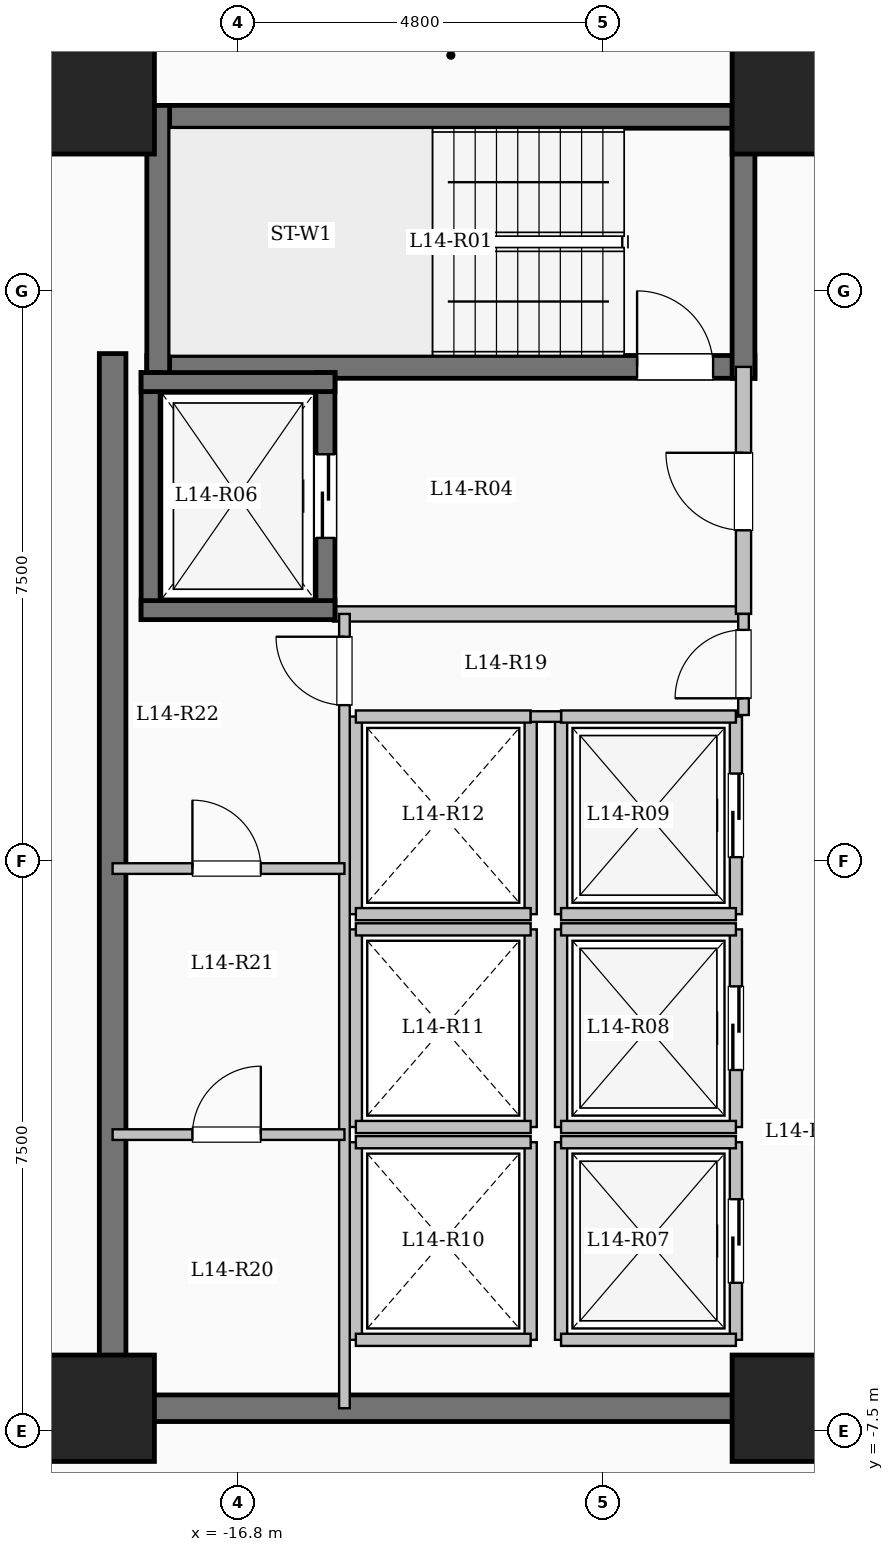
"""IFC4 building model, lengths in metres.
Left out: names, types, materials, properties, quantities, classifications, styles, units other than length and angle.
Written with IfcOpenShell. Run it as: python <this file> out.ifc"""

import sys

from ifc_helpers import new_model, si_unit, direction, frame, frame_2d, origin, origin_2d, place, context, subcontext, project, spatial, rectangle, extrude, element, fill, save


model = new_model("IFC4")
c1 = context("Model", 3, precision=1e-05, world=origin(), true_north=direction((0.0, 1.0)))
c2 = subcontext(c1, "Body", "Model", "MODEL_VIEW")
j1 = project(units=[si_unit("LENGTHUNIT", "METRE"), si_unit("PLANEANGLEUNIT", "RADIAN")], contexts=[c1])
p1 = place(None, origin())
s1 = spatial("IfcSite", under=j1, at=p1, CompositionType="ELEMENT")
p2 = place(p1, origin())
s2 = spatial("IfcBuilding", under=s1, at=p2, CompositionType="ELEMENT")
p3 = place(p2, frame((0.0, 0.0, 54.15)))
s3 = spatial("IfcBuildingStorey", under=s2, at=p3, CompositionType="ELEMENT", Elevation=54.15)
for number, where, z_axis, x_axis in (
    (1, (-9.6, -7.2, 0.0), (0.0, 0.0, 1.0), (1.0, 0.0, 0.0)),
    (2, (-9.6, 10.0, 0.0), (0.0, 0.0, 1.0), (1.0, 0.0, 0.0)),
    (3, (-18.6, -7.2, 0.0), (0.0, 0.0, 1.0), (1.0, 0.0, 0.0)),
    (4, (-18.6, 10.0, 0.0), (0.0, 0.0, 1.0), (1.0, 0.0, 0.0)),
):
    element("IfcColumn", number, at=place(p3, frame(where, z_axis=z_axis, x_axis=x_axis)), inside=s3, PredefinedType="COLUMN", context=c2, shape_type="SweptSolid", body=[
        extrude(rectangle(XDim=1.4, YDim=1.4, at=origin_2d()), origin(), (0.0, 0.0, 1.0), 3.35),
    ])
p4 = place(p3, frame((-18.0, 9.79, 0.0), z_axis=(0.0, 0.0, 1.0), x_axis=(1.0, 0.0, 0.0)))
e5 = element("IfcWall", 5, at=p4, inside=s3, PredefinedType="SHEAR", context=c2, shape_type="SweptSolid", body=[
    extrude(rectangle(XDim=8.0, YDim=0.3, at=frame_2d((4.0, 0.0))), origin(), (0.0, 0.0, 1.0), 3.35),
])
p5 = place(p3, frame((-18.0, 6.5, 0.0), z_axis=(0.0, 0.0, 1.0), x_axis=(1.0, 0.0, 0.0)))
e6 = element("IfcWall", 6, at=p5, inside=s3, PredefinedType="SHEAR", context=c2, shape_type="SweptSolid", body=[
    extrude(rectangle(XDim=8.0, YDim=0.3, at=frame_2d((4.0, 0.0))), origin(), (0.0, 0.0, 1.0), 3.35),
])
p6 = place(p5, frame((6.45, 0.0, 0.0)))
e7 = element("IfcOpeningElement", 7, at=p6, cuts=e6, PredefinedType="OPENING", context=c2, shape_type="SweptSolid", body=[
    extrude(rectangle(XDim=1.0, YDim=2.15, at=frame_2d((0.5, 1.075))), frame((0.0, 0.16, 0.0), z_axis=(0.0, -1.0, 0.0), x_axis=(1.0, 0.0, 0.0)), (0.0, 0.0, 1.0), 0.32),
])
for number, where, z_axis, x_axis in (
    (8, (-17.85, 6.35, 0.0), (0.0, 0.0, 1.0), (0.0, 1.0, 0.0)),
    (9, (-10.15, 6.35, 0.0), (0.0, 0.0, 1.0), (0.0, 1.0, 0.0)),
):
    element("IfcWall", number, at=place(p3, frame(where, z_axis=z_axis, x_axis=x_axis)), inside=s3, PredefinedType="SHEAR", context=c2, shape_type="SweptSolid", body=[
        extrude(rectangle(XDim=3.59, YDim=0.3, at=frame_2d((1.795, 0.0))), origin(), (0.0, 0.0, 1.0), 3.35),
    ])
p7 = place(p3, frame((-15.55, 3.25, 0.0), z_axis=(0.0, 0.0, 1.0), x_axis=(1.0, 0.0, 0.0)))
e10 = element("IfcWall", 10, at=p7, inside=s3, PredefinedType="SOLIDWALL", context=c2, shape_type="SweptSolid", body=[
    extrude(rectangle(XDim=5.4, YDim=0.2, at=frame_2d((2.7, 0.0))), origin(), (0.0, 0.0, 1.0), 3.1),
])
p8 = place(p3, frame((-10.15, 3.25, 0.0), z_axis=(0.0, 0.0, 1.0), x_axis=(0.0, 1.0, 0.0)))
e11 = element("IfcWall", 11, at=p8, inside=s3, PredefinedType="SOLIDWALL", context=c2, shape_type="SweptSolid", body=[
    extrude(rectangle(XDim=3.25, YDim=0.2, at=frame_2d((1.625, 0.0))), origin(), (0.0, 0.0, 1.0), 3.1),
])
p9 = place(p8, frame((1.1, 0.0, 0.0)))
e12 = element("IfcOpeningElement", 12, at=p9, cuts=e11, PredefinedType="OPENING", context=c2, shape_type="SweptSolid", body=[
    extrude(rectangle(XDim=1.02, YDim=2.15, at=frame_2d((0.51, 1.075))), frame((0.0, 0.11, 0.0), z_axis=(0.0, -1.0, 0.0), x_axis=(1.0, 0.0, 0.0)), (0.0, 0.0, 1.0), 0.22),
])
p10 = place(p3, frame((-17.95, 3.175, 0.0), z_axis=(0.0, 0.0, 1.0), x_axis=(0.0, 1.0, 0.0)))
e13 = element("IfcWall", 13, at=p10, inside=s3, PredefinedType="SHEAR", context=c2, shape_type="SweptSolid", body=[
    extrude(rectangle(XDim=3.25, YDim=0.25, at=frame_2d((1.625, 0.0))), origin(), (0.0, 0.0, 1.0), 3.35),
])
p11 = place(p3, frame((-15.65, 3.175, 0.0), z_axis=(0.0, 0.0, 1.0), x_axis=(0.0, 1.0, 0.0)))
e14 = element("IfcWall", 14, at=p11, inside=s3, PredefinedType="SHEAR", context=c2, shape_type="SweptSolid", body=[
    extrude(rectangle(XDim=3.25, YDim=0.25, at=frame_2d((1.625, 0.0))), origin(), (0.0, 0.0, 1.0), 3.35),
])
p12 = place(p11, frame((1.075, 0.0, 0.0)))
e15 = element("IfcOpeningElement", 15, at=p12, cuts=e14, PredefinedType="OPENING", context=c2, shape_type="SweptSolid", body=[
    extrude(rectangle(XDim=1.1, YDim=2.15, at=frame_2d((0.55, 1.075))), frame((0.0, 0.135, 0.0), z_axis=(0.0, -1.0, 0.0), x_axis=(1.0, 0.0, 0.0)), (0.0, 0.0, 1.0), 0.27),
])
for number, where, z_axis, x_axis in (
    (16, (-18.075, 3.3, 0.0), (0.0, 0.0, 1.0), (1.0, 0.0, 0.0)),
    (17, (-18.075, 6.3, 0.0), (0.0, 0.0, 1.0), (1.0, 0.0, 0.0)),
):
    element("IfcWall", number, at=place(p3, frame(where, z_axis=z_axis, x_axis=x_axis)), inside=s3, PredefinedType="SHEAR", context=c2, shape_type="SweptSolid", body=[
        extrude(rectangle(XDim=2.55, YDim=0.25, at=frame_2d((1.275, 0.0))), origin(), (0.0, 0.0, 1.0), 3.35),
    ])
p13 = place(p3, frame((-12.55, -6.3, 0.0), z_axis=(0.0, 0.0, 1.0), x_axis=(0.0, 1.0, 0.0)))
e18 = element("IfcWall", 18, at=p13, inside=s3, PredefinedType="SOLIDWALL", context=c2, shape_type="SweptSolid", body=[
    extrude(rectangle(XDim=2.6, YDim=0.16, at=frame_2d((1.3, 0.0))), origin(), (0.0, 0.0, 1.0), 3.1),
])
p14 = place(p3, frame((-10.25, -6.3, 0.0), z_axis=(0.0, 0.0, 1.0), x_axis=(0.0, 1.0, 0.0)))
e19 = element("IfcWall", 19, at=p14, inside=s3, PredefinedType="SOLIDWALL", context=c2, shape_type="SweptSolid", body=[
    extrude(rectangle(XDim=2.6, YDim=0.16, at=frame_2d((1.3, 0.0))), origin(), (0.0, 0.0, 1.0), 3.1),
])
p15 = place(p14, frame((0.75, 0.0, 0.0)))
e20 = element("IfcOpeningElement", 20, at=p15, cuts=e19, PredefinedType="OPENING", context=c2, shape_type="SweptSolid", body=[
    extrude(rectangle(XDim=1.1, YDim=2.15, at=frame_2d((0.55, 1.075))), frame((0.0, 0.09, 0.0), z_axis=(0.0, -1.0, 0.0), x_axis=(1.0, 0.0, 0.0)), (0.0, 0.0, 1.0), 0.18),
])
for number, where, z_axis, x_axis in (
    (21, (-12.55, -6.3, 0.0), (0.0, 0.0, 1.0), (1.0, 0.0, 0.0)),
    (22, (-12.55, -3.7, 0.0), (0.0, 0.0, 1.0), (1.0, 0.0, 0.0)),
):
    element("IfcWall", number, at=place(p3, frame(where, z_axis=z_axis, x_axis=x_axis)), inside=s3, PredefinedType="SOLIDWALL", context=c2, shape_type="SweptSolid", body=[
        extrude(rectangle(XDim=2.3, YDim=0.16, at=frame_2d((1.15, 0.0))), origin(), (0.0, 0.0, 1.0), 3.1),
    ])
p16 = place(p3, frame((-12.55, -3.5, 0.0), z_axis=(0.0, 0.0, 1.0), x_axis=(0.0, 1.0, 0.0)))
e23 = element("IfcWall", 23, at=p16, inside=s3, PredefinedType="SOLIDWALL", context=c2, shape_type="SweptSolid", body=[
    extrude(rectangle(XDim=2.6, YDim=0.16, at=frame_2d((1.3, 0.0))), origin(), (0.0, 0.0, 1.0), 3.1),
])
p17 = place(p3, frame((-10.25, -3.5, 0.0), z_axis=(0.0, 0.0, 1.0), x_axis=(0.0, 1.0, 0.0)))
e24 = element("IfcWall", 24, at=p17, inside=s3, PredefinedType="SOLIDWALL", context=c2, shape_type="SweptSolid", body=[
    extrude(rectangle(XDim=2.6, YDim=0.16, at=frame_2d((1.3, 0.0))), origin(), (0.0, 0.0, 1.0), 3.1),
])
p18 = place(p17, frame((0.75, 0.0, 0.0)))
e25 = element("IfcOpeningElement", 25, at=p18, cuts=e24, PredefinedType="OPENING", context=c2, shape_type="SweptSolid", body=[
    extrude(rectangle(XDim=1.1, YDim=2.15, at=frame_2d((0.55, 1.075))), frame((0.0, 0.09, 0.0), z_axis=(0.0, -1.0, 0.0), x_axis=(1.0, 0.0, 0.0)), (0.0, 0.0, 1.0), 0.18),
])
for number, where, z_axis, x_axis in (
    (26, (-12.55, -3.5, 0.0), (0.0, 0.0, 1.0), (1.0, 0.0, 0.0)),
    (27, (-12.55, -0.9, 0.0), (0.0, 0.0, 1.0), (1.0, 0.0, 0.0)),
):
    element("IfcWall", number, at=place(p3, frame(where, z_axis=z_axis, x_axis=x_axis)), inside=s3, PredefinedType="SOLIDWALL", context=c2, shape_type="SweptSolid", body=[
        extrude(rectangle(XDim=2.3, YDim=0.16, at=frame_2d((1.15, 0.0))), origin(), (0.0, 0.0, 1.0), 3.1),
    ])
p19 = place(p3, frame((-12.55, -0.7, 0.0), z_axis=(0.0, 0.0, 1.0), x_axis=(0.0, 1.0, 0.0)))
e28 = element("IfcWall", 28, at=p19, inside=s3, PredefinedType="SOLIDWALL", context=c2, shape_type="SweptSolid", body=[
    extrude(rectangle(XDim=2.6, YDim=0.16, at=frame_2d((1.3, 0.0))), origin(), (0.0, 0.0, 1.0), 3.1),
])
p20 = place(p3, frame((-10.25, -0.7, 0.0), z_axis=(0.0, 0.0, 1.0), x_axis=(0.0, 1.0, 0.0)))
e29 = element("IfcWall", 29, at=p20, inside=s3, PredefinedType="SOLIDWALL", context=c2, shape_type="SweptSolid", body=[
    extrude(rectangle(XDim=2.6, YDim=0.16, at=frame_2d((1.3, 0.0))), origin(), (0.0, 0.0, 1.0), 3.1),
])
p21 = place(p20, frame((0.75, 0.0, 0.0)))
e30 = element("IfcOpeningElement", 30, at=p21, cuts=e29, PredefinedType="OPENING", context=c2, shape_type="SweptSolid", body=[
    extrude(rectangle(XDim=1.1, YDim=2.15, at=frame_2d((0.55, 1.075))), frame((0.0, 0.09, 0.0), z_axis=(0.0, -1.0, 0.0), x_axis=(1.0, 0.0, 0.0)), (0.0, 0.0, 1.0), 0.18),
])
for number, where, z_axis, x_axis in (
    (31, (-12.55, -0.7, 0.0), (0.0, 0.0, 1.0), (1.0, 0.0, 0.0)),
    (32, (-12.55, 1.9, 0.0), (0.0, 0.0, 1.0), (1.0, 0.0, 0.0)),
):
    element("IfcWall", number, at=place(p3, frame(where, z_axis=z_axis, x_axis=x_axis)), inside=s3, PredefinedType="SOLIDWALL", context=c2, shape_type="SweptSolid", body=[
        extrude(rectangle(XDim=2.3, YDim=0.16, at=frame_2d((1.15, 0.0))), origin(), (0.0, 0.0, 1.0), 3.1),
    ])
for number, where, z_axis, x_axis in (
    (33, (-15.25, -6.3, 0.0), (0.0, 0.0, 1.0), (0.0, 1.0, 0.0)),
    (34, (-12.95, -6.3, 0.0), (0.0, 0.0, 1.0), (0.0, 1.0, 0.0)),
):
    element("IfcWall", number, at=place(p3, frame(where, z_axis=z_axis, x_axis=x_axis)), inside=s3, PredefinedType="SOLIDWALL", context=c2, shape_type="SweptSolid", body=[
        extrude(rectangle(XDim=2.6, YDim=0.16, at=frame_2d((1.3, 0.0))), origin(), (0.0, 0.0, 1.0), 3.1),
    ])
for number, where, z_axis, x_axis in (
    (35, (-15.25, -6.3, 0.0), (0.0, 0.0, 1.0), (1.0, 0.0, 0.0)),
    (36, (-15.25, -3.7, 0.0), (0.0, 0.0, 1.0), (1.0, 0.0, 0.0)),
):
    element("IfcWall", number, at=place(p3, frame(where, z_axis=z_axis, x_axis=x_axis)), inside=s3, PredefinedType="SOLIDWALL", context=c2, shape_type="SweptSolid", body=[
        extrude(rectangle(XDim=2.3, YDim=0.16, at=frame_2d((1.15, 0.0))), origin(), (0.0, 0.0, 1.0), 3.1),
    ])
for number, where, z_axis, x_axis in (
    (37, (-15.25, -3.5, 0.0), (0.0, 0.0, 1.0), (0.0, 1.0, 0.0)),
    (38, (-12.95, -3.5, 0.0), (0.0, 0.0, 1.0), (0.0, 1.0, 0.0)),
):
    element("IfcWall", number, at=place(p3, frame(where, z_axis=z_axis, x_axis=x_axis)), inside=s3, PredefinedType="SOLIDWALL", context=c2, shape_type="SweptSolid", body=[
        extrude(rectangle(XDim=2.6, YDim=0.16, at=frame_2d((1.3, 0.0))), origin(), (0.0, 0.0, 1.0), 3.1),
    ])
for number, where, z_axis, x_axis in (
    (39, (-15.25, -3.5, 0.0), (0.0, 0.0, 1.0), (1.0, 0.0, 0.0)),
    (40, (-15.25, -0.9, 0.0), (0.0, 0.0, 1.0), (1.0, 0.0, 0.0)),
):
    element("IfcWall", number, at=place(p3, frame(where, z_axis=z_axis, x_axis=x_axis)), inside=s3, PredefinedType="SOLIDWALL", context=c2, shape_type="SweptSolid", body=[
        extrude(rectangle(XDim=2.3, YDim=0.16, at=frame_2d((1.15, 0.0))), origin(), (0.0, 0.0, 1.0), 3.1),
    ])
for number, where, z_axis, x_axis in (
    (41, (-15.25, -0.7, 0.0), (0.0, 0.0, 1.0), (0.0, 1.0, 0.0)),
    (42, (-12.95, -0.7, 0.0), (0.0, 0.0, 1.0), (0.0, 1.0, 0.0)),
):
    element("IfcWall", number, at=place(p3, frame(where, z_axis=z_axis, x_axis=x_axis)), inside=s3, PredefinedType="SOLIDWALL", context=c2, shape_type="SweptSolid", body=[
        extrude(rectangle(XDim=2.6, YDim=0.16, at=frame_2d((1.3, 0.0))), origin(), (0.0, 0.0, 1.0), 3.1),
    ])
for number, where, z_axis, x_axis in (
    (43, (-15.25, -0.7, 0.0), (0.0, 0.0, 1.0), (1.0, 0.0, 0.0)),
    (44, (-15.25, 1.9, 0.0), (0.0, 0.0, 1.0), (1.0, 0.0, 0.0)),
):
    element("IfcWall", number, at=place(p3, frame(where, z_axis=z_axis, x_axis=x_axis)), inside=s3, PredefinedType="SOLIDWALL", context=c2, shape_type="SweptSolid", body=[
        extrude(rectangle(XDim=2.3, YDim=0.16, at=frame_2d((1.15, 0.0))), origin(), (0.0, 0.0, 1.0), 3.1),
    ])
p22 = place(p3, frame((-18.45, -7.375, 0.0), z_axis=(0.0, 0.0, 1.0), x_axis=(0.0, 1.0, 0.0)))
e45 = element("IfcWall", 45, at=p22, inside=s3, PredefinedType="SHEAR", context=c2, shape_type="SweptSolid", body=[
    extrude(rectangle(XDim=14.05, YDim=0.35, at=frame_2d((7.025, 0.0))), origin(), (0.0, 0.0, 1.0), 3.35),
])
p23 = place(p3, frame((-18.625, -7.2, 0.0), z_axis=(0.0, 0.0, 1.0), x_axis=(1.0, 0.0, 0.0)))
e46 = element("IfcWall", 46, at=p23, inside=s3, PredefinedType="SHEAR", context=c2, shape_type="SweptSolid", body=[
    extrude(rectangle(XDim=8.55, YDim=0.35, at=frame_2d((4.275, 0.0))), origin(), (0.0, 0.0, 1.0), 3.35),
])
p24 = place(p3, frame((-12.95, 1.9, 0.0), z_axis=(0.0, 0.0, 1.0), x_axis=(1.0, 0.0, 0.0)))
e47 = element("IfcWall", 47, at=p24, inside=s3, PredefinedType="PARTITIONING", context=c2, shape_type="SweptSolid", body=[
    extrude(rectangle(XDim=0.4, YDim=0.14, at=frame_2d((0.2, 0.0))), origin(), (0.0, 0.0, 1.0), 3.1),
])
p25 = place(p3, frame((-10.15, 1.92, 0.0), z_axis=(0.0, 0.0, 1.0), x_axis=(0.0, 1.0, 0.0)))
e48 = element("IfcWall", 48, at=p25, inside=s3, PredefinedType="PARTITIONING", context=c2, shape_type="SweptSolid", body=[
    extrude(rectangle(XDim=1.33, YDim=0.14, at=frame_2d((0.665, 0.0))), origin(), (0.0, 0.0, 1.0), 3.1),
])
p26 = place(p25, frame((0.22, 0.0, 0.0)))
e49 = element("IfcOpeningElement", 49, at=p26, cuts=e48, PredefinedType="OPENING", context=c2, shape_type="SweptSolid", body=[
    extrude(rectangle(XDim=0.9, YDim=2.08, at=frame_2d((0.45, 1.04))), frame((0.0, 0.08, 0.0), z_axis=(0.0, -1.0, 0.0), x_axis=(1.0, 0.0, 0.0)), (0.0, 0.0, 1.0), 0.16),
])
p27 = place(p3, frame((-15.4, -7.2, 0.0), z_axis=(0.0, 0.0, 1.0), x_axis=(0.0, 1.0, 0.0)))
e50 = element("IfcWall", 50, at=p27, inside=s3, PredefinedType="PARTITIONING", context=c2, shape_type="SweptSolid", body=[
    extrude(rectangle(XDim=10.45, YDim=0.14, at=frame_2d((5.225, 0.0))), origin(), (0.0, 0.0, 1.0), 3.1),
])
p28 = place(p27, frame((9.25, 0.0, 0.0)))
e51 = element("IfcOpeningElement", 51, at=p28, cuts=e50, PredefinedType="OPENING", context=c2, shape_type="SweptSolid", body=[
    extrude(rectangle(XDim=0.9, YDim=2.08, at=frame_2d((0.45, 1.04))), frame((0.0, 0.08, 0.0), z_axis=(0.0, -1.0, 0.0), x_axis=(1.0, 0.0, 0.0)), (0.0, 0.0, 1.0), 0.16),
])
p29 = place(p3, frame((-18.45, -3.6, 0.0), z_axis=(0.0, 0.0, 1.0), x_axis=(1.0, 0.0, 0.0)))
e52 = element("IfcWall", 52, at=p29, inside=s3, PredefinedType="PARTITIONING", context=c2, shape_type="SweptSolid", body=[
    extrude(rectangle(XDim=3.05, YDim=0.14, at=frame_2d((1.525, 0.0))), origin(), (0.0, 0.0, 1.0), 3.1),
])
p30 = place(p29, frame((1.05, 0.0, 0.0)))
e53 = element("IfcOpeningElement", 53, at=p30, cuts=e52, PredefinedType="OPENING", context=c2, shape_type="SweptSolid", body=[
    extrude(rectangle(XDim=0.9, YDim=2.08, at=frame_2d((0.45, 1.04))), frame((0.0, 0.08, 0.0), z_axis=(0.0, -1.0, 0.0), x_axis=(1.0, 0.0, 0.0)), (0.0, 0.0, 1.0), 0.16),
])
p31 = place(p3, frame((-18.45, -0.1, 0.0), z_axis=(0.0, 0.0, 1.0), x_axis=(1.0, 0.0, 0.0)))
e54 = element("IfcWall", 54, at=p31, inside=s3, PredefinedType="PARTITIONING", context=c2, shape_type="SweptSolid", body=[
    extrude(rectangle(XDim=3.05, YDim=0.14, at=frame_2d((1.525, 0.0))), origin(), (0.0, 0.0, 1.0), 3.1),
])
p32 = place(p31, frame((1.05, 0.0, 0.0)))
e55 = element("IfcOpeningElement", 55, at=p32, cuts=e54, PredefinedType="OPENING", context=c2, shape_type="SweptSolid", body=[
    extrude(rectangle(XDim=0.9, YDim=2.08, at=frame_2d((0.45, 1.04))), frame((0.0, 0.08, 0.0), z_axis=(0.0, -1.0, 0.0), x_axis=(1.0, 0.0, 0.0)), (0.0, 0.0, 1.0), 0.16),
])
p33 = place(p3, frame((-28.68, -7.25, 0.0), z_axis=(0.0, 0.0, 1.0), x_axis=(1.0, 0.0, 0.0)))
e56 = element("IfcWall", 56, at=p33, inside=s3, PredefinedType="PARTITIONING", context=c2, shape_type="SweptSolid", body=[
    extrude(rectangle(XDim=10.23, YDim=0.15, at=frame_2d((5.115, 0.0))), origin(), (0.0, 0.0, 1.0), 3.1),
])
p34 = place(p33, frame((7.03, 0.0, 0.0)))
e57 = element("IfcOpeningElement", 57, at=p34, cuts=e56, PredefinedType="OPENING", context=c2, shape_type="SweptSolid", body=[
    extrude(rectangle(XDim=1.08, YDim=2.15, at=frame_2d((0.54, 1.075))), frame((0.0, 0.085, 0.0), z_axis=(0.0, -1.0, 0.0), x_axis=(1.0, 0.0, 0.0)), (0.0, 0.0, 1.0), 0.17),
])
p35 = place(p6, origin())
e58 = element("IfcDoor", 58, at=p35, inside=s3, OperationType="SINGLE_SWING_LEFT", PredefinedType="DOOR", context=c2, shape_type="SweptSolid", body=[
    extrude(rectangle(XDim=1.0, YDim=2.15, at=frame_2d((0.5, 1.075))), frame((0.0, 0.025, 0.0), z_axis=(0.0, -1.0, 0.0), x_axis=(1.0, 0.0, 0.0)), (0.0, 0.0, 1.0), 0.05),
])
fill(e7, e58)
p36 = place(p9, origin())
e59 = element("IfcDoor", 59, at=p36, inside=s3, OperationType="SINGLE_SWING_RIGHT", PredefinedType="DOOR", context=c2, shape_type="SweptSolid", body=[
    extrude(rectangle(XDim=1.02, YDim=2.15, at=frame_2d((0.51, 1.075))), frame((0.0, 0.025, 0.0), z_axis=(0.0, -1.0, 0.0), x_axis=(1.0, 0.0, 0.0)), (0.0, 0.0, 1.0), 0.05),
])
fill(e12, e59)
p37 = place(p12, origin())
e60 = element("IfcDoor", 60, at=p37, inside=s3, OperationType="SLIDING_TO_LEFT", PredefinedType="DOOR", context=c2, shape_type="SweptSolid", body=[
    extrude(rectangle(XDim=1.1, YDim=2.15, at=frame_2d((0.55, 1.075))), frame((0.0, 0.025, 0.0), z_axis=(0.0, -1.0, 0.0), x_axis=(1.0, 0.0, 0.0)), (0.0, 0.0, 1.0), 0.05),
])
fill(e15, e60)
p38 = place(p15, origin())
e61 = element("IfcDoor", 61, at=p38, inside=s3, OperationType="SLIDING_TO_LEFT", PredefinedType="DOOR", context=c2, shape_type="SweptSolid", body=[
    extrude(rectangle(XDim=1.1, YDim=2.15, at=frame_2d((0.55, 1.075))), frame((0.0, 0.025, 0.0), z_axis=(0.0, -1.0, 0.0), x_axis=(1.0, 0.0, 0.0)), (0.0, 0.0, 1.0), 0.05),
])
fill(e20, e61)
p39 = place(p18, origin())
e62 = element("IfcDoor", 62, at=p39, inside=s3, OperationType="SLIDING_TO_LEFT", PredefinedType="DOOR", context=c2, shape_type="SweptSolid", body=[
    extrude(rectangle(XDim=1.1, YDim=2.15, at=frame_2d((0.55, 1.075))), frame((0.0, 0.025, 0.0), z_axis=(0.0, -1.0, 0.0), x_axis=(1.0, 0.0, 0.0)), (0.0, 0.0, 1.0), 0.05),
])
fill(e25, e62)
p40 = place(p21, origin())
e63 = element("IfcDoor", 63, at=p40, inside=s3, OperationType="SLIDING_TO_LEFT", PredefinedType="DOOR", context=c2, shape_type="SweptSolid", body=[
    extrude(rectangle(XDim=1.1, YDim=2.15, at=frame_2d((0.55, 1.075))), frame((0.0, 0.025, 0.0), z_axis=(0.0, -1.0, 0.0), x_axis=(1.0, 0.0, 0.0)), (0.0, 0.0, 1.0), 0.05),
])
fill(e30, e63)
p41 = place(p26, origin())
e64 = element("IfcDoor", 64, at=p41, inside=s3, OperationType="SINGLE_SWING_LEFT", PredefinedType="DOOR", context=c2, shape_type="SweptSolid", body=[
    extrude(rectangle(XDim=0.9, YDim=2.08, at=frame_2d((0.45, 1.04))), frame((0.0, 0.025, 0.0), z_axis=(0.0, -1.0, 0.0), x_axis=(1.0, 0.0, 0.0)), (0.0, 0.0, 1.0), 0.05),
])
fill(e49, e64)
p42 = place(p28, origin())
e65 = element("IfcDoor", 65, at=p42, inside=s3, OperationType="SINGLE_SWING_RIGHT", PredefinedType="DOOR", context=c2, shape_type="SweptSolid", body=[
    extrude(rectangle(XDim=0.9, YDim=2.08, at=frame_2d((0.45, 1.04))), frame((0.0, 0.025, 0.0), z_axis=(0.0, -1.0, 0.0), x_axis=(1.0, 0.0, 0.0)), (0.0, 0.0, 1.0), 0.05),
])
fill(e51, e65)
p43 = place(p32, origin())
e66 = element("IfcDoor", 66, at=p43, inside=s3, OperationType="SINGLE_SWING_LEFT", PredefinedType="DOOR", context=c2, shape_type="SweptSolid", body=[
    extrude(rectangle(XDim=0.9, YDim=2.08, at=frame_2d((0.45, 1.04))), frame((0.0, 0.025, 0.0), z_axis=(0.0, -1.0, 0.0), x_axis=(1.0, 0.0, 0.0)), (0.0, 0.0, 1.0), 0.05),
])
fill(e55, e66)
p44 = place(p30, origin())
e67 = element("IfcDoor", 67, at=p44, inside=s3, OperationType="SINGLE_SWING_RIGHT", PredefinedType="DOOR", context=c2, shape_type="SweptSolid", body=[
    extrude(rectangle(XDim=0.9, YDim=2.08, at=frame_2d((0.45, 1.04))), frame((0.0, 0.025, 0.0), z_axis=(0.0, -1.0, 0.0), x_axis=(1.0, 0.0, 0.0)), (0.0, 0.0, 1.0), 0.05),
])
fill(e53, e67)
save(model, sys.argv[1])
